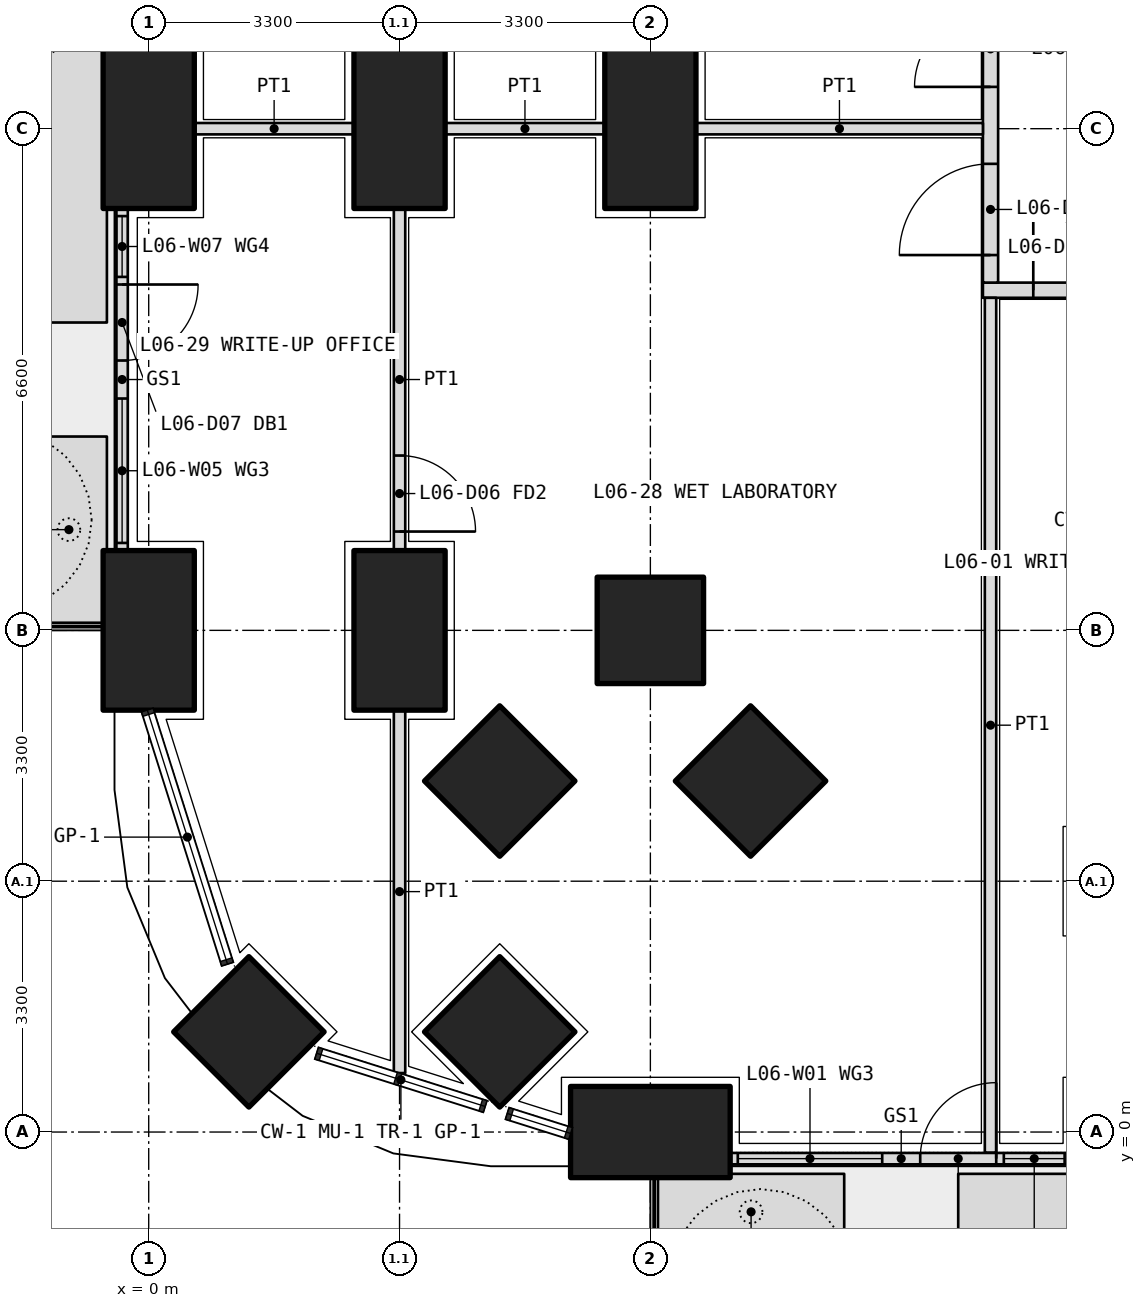
"""IFC4 building model, lengths in metres.
Left out: names, types, materials, properties, quantities, classifications, styles, units other than length and angle.
Written with IfcOpenShell. Run it as: python <this file> out.ifc"""

import sys

from ifc_helpers import new_model, si_unit, direction, frame, frame_2d, origin, origin_2d, place, context, subcontext, project, spatial, polyline, rectangle, outline, extrude, element, fill, save


model = new_model("IFC4")
c1 = context("Model", 3, precision=1e-05, world=origin(), true_north=direction((0.0, 1.0)))
c2 = subcontext(c1, "Body", "Model", "MODEL_VIEW")
j1 = project(units=[si_unit("LENGTHUNIT", "METRE"), si_unit("PLANEANGLEUNIT", "RADIAN")], contexts=[c1])
p1 = place(None, origin())
s1 = spatial("IfcSite", under=j1, at=p1, CompositionType="ELEMENT")
p2 = place(p1, origin())
s2 = spatial("IfcBuilding", under=s1, at=p2, CompositionType="ELEMENT")
p3 = place(p2, frame((0.0, 0.0, 29.7)))
s3 = spatial("IfcBuildingStorey", under=s2, at=p3, CompositionType="ELEMENT", Elevation=29.7)
p4 = place(p3, frame((1.318, 1.318, 0.0), z_axis=(0.0, 0.0, 1.0), x_axis=(0.707106781187, 0.707106781187, 0.0)))
e1 = element("IfcColumn", 1, at=p4, inside=s3, PredefinedType="COLUMN", context=c2, shape_type="SweptSolid", body=[
    extrude(rectangle(XDim=1.4, YDim=1.4, at=origin_2d()), origin(), (0.0, 0.0, 1.0), 4.2),
])
for number, where, z_axis, x_axis in (
    (2, (6.6, 0.0, 0.0), (0.0, 0.0, 1.0), (1.0, 0.0, 0.0)),
    (3, (0.0, 6.6, 0.0), (0.0, 0.0, 1.0), (0.0, 1.0, 0.0)),
    (4, (0.0, 13.2, 0.0), (0.0, 0.0, 1.0), (0.0, 1.0, 0.0)),
):
    element("IfcColumn", number, at=place(p3, frame(where, z_axis=z_axis, x_axis=x_axis)), inside=s3, PredefinedType="COLUMN", context=c2, shape_type="SweptSolid", body=[
        extrude(rectangle(XDim=2.1, YDim=1.2, at=origin_2d()), origin(), (0.0, 0.0, 1.0), 4.2),
    ])
for number, where, z_axis, x_axis in (
    (5, (6.6, 6.6, 0.0), (0.0, 0.0, 1.0), (1.0, 0.0, 0.0)),
    (6, (4.618, 1.318, 0.0), (0.0, 0.0, 1.0), (0.707, 0.707, 0.0)),
):
    element("IfcColumn", number, at=place(p3, frame(where, z_axis=z_axis, x_axis=x_axis)), inside=s3, PredefinedType="COLUMN", context=c2, shape_type="SweptSolid", body=[
        extrude(rectangle(XDim=1.4, YDim=1.4, at=origin_2d()), origin(), (0.0, 0.0, 1.0), 4.2),
    ])
for number, where, z_axis, x_axis in (
    (7, (3.3, 6.6, 0.0), (0.0, 0.0, 1.0), (0.0, 1.0, 0.0)),
    (8, (3.3, 13.2, 0.0), (0.0, 0.0, 1.0), (0.0, 1.0, 0.0)),
):
    element("IfcColumn", number, at=place(p3, frame(where, z_axis=z_axis, x_axis=x_axis)), inside=s3, PredefinedType="COLUMN", context=c2, shape_type="SweptSolid", body=[
        extrude(rectangle(XDim=2.1, YDim=1.2, at=origin_2d()), origin(), (0.0, 0.0, 1.0), 4.2),
    ])
for number, where, z_axis, x_axis in (
    (9, (4.618, 4.618, 0.0), (0.0, 0.0, 1.0), (0.707, 0.707, 0.0)),
    (10, (7.918, 4.618, 0.0), (0.0, 0.0, 1.0), (0.707, 0.707, 0.0)),
):
    element("IfcColumn", number, at=place(p3, frame(where, z_axis=z_axis, x_axis=x_axis)), inside=s3, PredefinedType="COLUMN", context=c2, shape_type="SweptSolid", body=[
        extrude(rectangle(XDim=1.4, YDim=1.4, at=origin_2d()), origin(), (0.0, 0.0, 1.0), 4.2),
    ])
p5 = place(p3, frame((6.6, 13.2, 0.0), z_axis=(0.0, 0.0, 1.0), x_axis=(0.0, 1.0, 0.0)))
e11 = element("IfcColumn", 11, at=p5, inside=s3, PredefinedType="COLUMN", context=c2, shape_type="SweptSolid", body=[
    extrude(rectangle(XDim=2.1, YDim=1.2, at=origin_2d()), origin(), (0.0, 0.0, 1.0), 4.2),
])
p6 = place(p3, origin())
e12 = element("IfcWall", 12, at=p6, inside=s3, PredefinedType="USERDEFINED", context=c2, shape_type="SweptSolid", body=[
    extrude(outline(polyline([(6.7, -1.55), (9.15, -1.55), (9.15, -0.55), (6.7, -0.55), (6.7, -1.55)]), holes=[polyline([(6.85, -1.4), (9.0, -1.4), (9.0, -0.7), (6.85, -0.7), (6.85, -1.4)])]), origin(), (0.0, 0.0, 1.0), 1.05),
])
p7 = place(p3, origin())
e13 = element("IfcWall", 13, at=p7, inside=s3, PredefinedType="USERDEFINED", context=c2, shape_type="SweptSolid", body=[
    extrude(outline(polyline([(10.65, -1.55), (19.7, -1.55), (19.7, -0.55), (10.65, -0.55), (10.65, -1.55)]), holes=[polyline([(10.8, -1.4), (19.55, -1.4), (19.55, -0.7), (10.8, -0.7), (10.8, -1.4)])]), origin(), (0.0, 0.0, 1.0), 1.05),
])
p8 = place(p3, origin())
e14 = element("IfcWall", 14, at=p8, inside=s3, PredefinedType="USERDEFINED", context=c2, shape_type="SweptSolid", body=[
    extrude(outline(polyline([(-1.55, 6.7), (-0.55, 6.7), (-0.55, 9.15), (-1.55, 9.15), (-1.55, 6.7)]), holes=[polyline([(-1.4, 6.85), (-0.7, 6.85), (-0.7, 9.0), (-1.4, 9.0), (-1.4, 6.85)])]), origin(), (0.0, 0.0, 1.0), 1.05),
])
p9 = place(p3, origin())
e15 = element("IfcWall", 15, at=p9, inside=s3, PredefinedType="USERDEFINED", context=c2, shape_type="SweptSolid", body=[
    extrude(outline(polyline([(-1.55, 10.65), (-0.55, 10.65), (-0.55, 19.7), (-1.55, 19.7), (-1.55, 10.65)]), holes=[polyline([(-1.4, 10.8), (-0.7, 10.8), (-0.7, 19.55), (-1.4, 19.55), (-1.4, 10.8)])]), origin(), (0.0, 0.0, 1.0), 1.05),
])
p10 = place(p3, frame((7.65, -0.35, 0.0), z_axis=(0.0, 0.0, 1.0), x_axis=(1.0, 0.0, 0.0)))
e16 = element("IfcWall", 16, at=p10, inside=s3, PredefinedType="SOLIDWALL", context=c2, shape_type="SweptSolid", body=[
    extrude(rectangle(XDim=4.5, YDim=0.15, at=frame_2d((2.25, 0.0))), origin(), (0.0, 0.0, 1.0), 2.7),
])
p11 = place(p10, frame((2.5, 0.0, 0.0)))
e17 = element("IfcOpeningElement", 17, at=p11, cuts=e16, PredefinedType="OPENING", context=c2, shape_type="SweptSolid", body=[
    extrude(rectangle(XDim=1.0, YDim=2.4, at=frame_2d((0.5, 1.2))), frame((0.0, 0.085, 0.0), z_axis=(0.0, -1.0, 0.0), x_axis=(1.0, 0.0, 0.0)), (0.0, 0.0, 1.0), 0.17),
])
p12 = place(p10, frame((0.1, 0.0, 0.1)))
e18 = element("IfcOpeningElement", 18, at=p12, cuts=e16, PredefinedType="OPENING", context=c2, shape_type="SweptSolid", body=[
    extrude(rectangle(XDim=1.9, YDim=2.3, at=frame_2d((0.95, 1.15))), frame((0.0, 0.085, 0.0), z_axis=(0.0, -1.0, 0.0), x_axis=(1.0, 0.0, 0.0)), (0.0, 0.0, 1.0), 0.17),
])
p13 = place(p10, frame((3.6, 0.0, 0.1)))
e19 = element("IfcOpeningElement", 19, at=p13, cuts=e16, PredefinedType="OPENING", context=c2, shape_type="SweptSolid", body=[
    extrude(rectangle(XDim=0.8, YDim=2.3, at=frame_2d((0.4, 1.15))), frame((0.0, 0.085, 0.0), z_axis=(0.0, -1.0, 0.0), x_axis=(1.0, 0.0, 0.0)), (0.0, 0.0, 1.0), 0.17),
])
p14 = place(p3, frame((-0.35, 12.15, 0.0), z_axis=(0.0, 0.0, 1.0), x_axis=(0.0, -1.0, 0.0)))
e20 = element("IfcWall", 20, at=p14, inside=s3, PredefinedType="SOLIDWALL", context=c2, shape_type="SweptSolid", body=[
    extrude(rectangle(XDim=4.5, YDim=0.15, at=frame_2d((2.25, 0.0))), origin(), (0.0, 0.0, 1.0), 2.7),
])
p15 = place(p14, frame((1.0, 0.0, 0.0)))
e21 = element("IfcOpeningElement", 21, at=p15, cuts=e20, PredefinedType="OPENING", context=c2, shape_type="SweptSolid", body=[
    extrude(rectangle(XDim=1.0, YDim=2.4, at=frame_2d((0.5, 1.2))), frame((0.0, 0.085, 0.0), z_axis=(0.0, -1.0, 0.0), x_axis=(1.0, 0.0, 0.0)), (0.0, 0.0, 1.0), 0.17),
])
p16 = place(p14, frame((0.1, 0.0, 0.1)))
e22 = element("IfcOpeningElement", 22, at=p16, cuts=e20, PredefinedType="OPENING", context=c2, shape_type="SweptSolid", body=[
    extrude(rectangle(XDim=0.8, YDim=2.3, at=frame_2d((0.4, 1.15))), frame((0.0, 0.085, 0.0), z_axis=(0.0, -1.0, 0.0), x_axis=(1.0, 0.0, 0.0)), (0.0, 0.0, 1.0), 0.17),
])
p17 = place(p14, frame((2.5, 0.0, 0.1)))
e23 = element("IfcOpeningElement", 23, at=p17, cuts=e20, PredefinedType="OPENING", context=c2, shape_type="SweptSolid", body=[
    extrude(rectangle(XDim=1.9, YDim=2.3, at=frame_2d((0.95, 1.15))), frame((0.0, 0.085, 0.0), z_axis=(0.0, -1.0, 0.0), x_axis=(1.0, 0.0, 0.0)), (0.0, 0.0, 1.0), 0.17),
])
p18 = place(p3, frame((10.975, 11.075, 0.0), z_axis=(0.0, 0.0, 1.0), x_axis=(1.0, 0.0, 0.0)))
e24 = element("IfcWall", 24, at=p18, inside=s3, PredefinedType="PARTITIONING", context=c2, shape_type="SweptSolid", body=[
    extrude(rectangle(XDim=30.85, YDim=0.2, at=frame_2d((15.425, 0.0))), origin(), (0.0, 0.0, 1.0), 2.85),
])
p19 = place(p18, frame((0.663, 0.0, 0.0)))
e25 = element("IfcOpeningElement", 25, at=p19, cuts=e24, PredefinedType="OPENING", context=c2, shape_type="SweptSolid", body=[
    extrude(rectangle(XDim=1.0, YDim=2.1, at=frame_2d((0.5, 1.05))), frame((0.0, 0.11, 0.0), z_axis=(0.0, -1.0, 0.0), x_axis=(1.0, 0.0, 0.0)), (0.0, 0.0, 1.0), 0.22),
])
p20 = place(p18, frame((8.325, 0.0, 0.0)))
e26 = element("IfcOpeningElement", 26, at=p20, cuts=e24, PredefinedType="OPENING", context=c2, shape_type="SweptSolid", body=[
    extrude(rectangle(XDim=1.0, YDim=2.1, at=frame_2d((0.5, 1.05))), frame((0.0, 0.11, 0.0), z_axis=(0.0, -1.0, 0.0), x_axis=(1.0, 0.0, 0.0)), (0.0, 0.0, 1.0), 0.22),
])
p21 = place(p18, frame((19.875, 0.0, 0.0)))
e27 = element("IfcOpeningElement", 27, at=p21, cuts=e24, PredefinedType="OPENING", context=c2, shape_type="SweptSolid", body=[
    extrude(rectangle(XDim=1.0, YDim=2.1, at=frame_2d((0.5, 1.05))), frame((0.0, 0.11, 0.0), z_axis=(0.0, -1.0, 0.0), x_axis=(1.0, 0.0, 0.0)), (0.0, 0.0, 1.0), 0.22),
])
p22 = place(p18, frame((27.538, 0.0, 0.0)))
e28 = element("IfcOpeningElement", 28, at=p22, cuts=e24, PredefinedType="OPENING", context=c2, shape_type="SweptSolid", body=[
    extrude(rectangle(XDim=1.0, YDim=2.1, at=frame_2d((0.5, 1.05))), frame((0.0, 0.11, 0.0), z_axis=(0.0, -1.0, 0.0), x_axis=(1.0, 0.0, 0.0)), (0.0, 0.0, 1.0), 0.22),
])
p23 = place(p3, frame((11.075, 11.175, 0.0), z_axis=(0.0, 0.0, 1.0), x_axis=(0.0, 1.0, 0.0)))
e29 = element("IfcWall", 29, at=p23, inside=s3, PredefinedType="PARTITIONING", context=c2, shape_type="SweptSolid", body=[
    extrude(rectangle(XDim=23.85, YDim=0.2, at=frame_2d((11.925, 0.0))), origin(), (0.0, 0.0, 1.0), 2.85),
])
p24 = place(p23, frame((0.363, 0.0, 0.0)))
e30 = element("IfcOpeningElement", 30, at=p24, cuts=e29, PredefinedType="OPENING", context=c2, shape_type="SweptSolid", body=[
    extrude(rectangle(XDim=1.2, YDim=2.1, at=frame_2d((0.6, 1.05))), frame((0.0, 0.11, 0.0), z_axis=(0.0, -1.0, 0.0), x_axis=(1.0, 0.0, 0.0)), (0.0, 0.0, 1.0), 0.22),
])
p25 = place(p23, frame((2.575, 0.0, 0.0)))
e31 = element("IfcOpeningElement", 31, at=p25, cuts=e29, PredefinedType="OPENING", context=c2, shape_type="SweptSolid", body=[
    extrude(rectangle(XDim=1.0, YDim=2.1, at=frame_2d((0.5, 1.05))), frame((0.0, 0.11, 0.0), z_axis=(0.0, -1.0, 0.0), x_axis=(1.0, 0.0, 0.0)), (0.0, 0.0, 1.0), 0.22),
])
p26 = place(p23, frame((5.625, 0.0, 0.0)))
e32 = element("IfcOpeningElement", 32, at=p26, cuts=e29, PredefinedType="OPENING", context=c2, shape_type="SweptSolid", body=[
    extrude(rectangle(XDim=0.9, YDim=2.1, at=frame_2d((0.45, 1.05))), frame((0.0, 0.11, 0.0), z_axis=(0.0, -1.0, 0.0), x_axis=(1.0, 0.0, 0.0)), (0.0, 0.0, 1.0), 0.22),
])
p27 = place(p23, frame((9.425, 0.0, 0.0)))
e33 = element("IfcOpeningElement", 33, at=p27, cuts=e29, PredefinedType="OPENING", context=c2, shape_type="SweptSolid", body=[
    extrude(rectangle(XDim=0.9, YDim=2.1, at=frame_2d((0.45, 1.05))), frame((0.0, 0.11, 0.0), z_axis=(0.0, -1.0, 0.0), x_axis=(1.0, 0.0, 0.0)), (0.0, 0.0, 1.0), 0.22),
])
p28 = place(p23, frame((12.975, 0.0, 0.0)))
e34 = element("IfcOpeningElement", 34, at=p28, cuts=e29, PredefinedType="OPENING", context=c2, shape_type="SweptSolid", body=[
    extrude(rectangle(XDim=1.0, YDim=2.1, at=frame_2d((0.5, 1.05))), frame((0.0, 0.11, 0.0), z_axis=(0.0, -1.0, 0.0), x_axis=(1.0, 0.0, 0.0)), (0.0, 0.0, 1.0), 0.22),
])
p29 = place(p23, frame((17.925, 0.0, 0.0)))
e35 = element("IfcOpeningElement", 35, at=p29, cuts=e29, PredefinedType="OPENING", context=c2, shape_type="SweptSolid", body=[
    extrude(rectangle(XDim=1.2, YDim=2.1, at=frame_2d((0.6, 1.05))), frame((0.0, 0.11, 0.0), z_axis=(0.0, -1.0, 0.0), x_axis=(1.0, 0.0, 0.0)), (0.0, 0.0, 1.0), 0.22),
])
p30 = place(p23, frame((22.387, 0.0, 0.0)))
e36 = element("IfcOpeningElement", 36, at=p30, cuts=e29, PredefinedType="OPENING", context=c2, shape_type="SweptSolid", body=[
    extrude(rectangle(XDim=1.0, YDim=2.1, at=frame_2d((0.5, 1.05))), frame((0.0, 0.11, 0.0), z_axis=(0.0, -1.0, 0.0), x_axis=(1.0, 0.0, 0.0)), (0.0, 0.0, 1.0), 0.22),
])
p31 = place(p3, frame((11.075, -0.27, 0.0), z_axis=(0.0, 0.0, 1.0), x_axis=(0.0, 1.0, 0.0)))
e37 = element("IfcWall", 37, at=p31, inside=s3, PredefinedType="PARTITIONING", context=c2, shape_type="SweptSolid", body=[
    extrude(rectangle(XDim=11.245, YDim=0.15, at=frame_2d((5.623, 0.0))), origin(), (0.0, 0.0, 1.0), 2.7),
])
p32 = place(p3, frame((3.3, 12.15, 0.0), z_axis=(0.0, 0.0, 1.0), x_axis=(0.0, -1.0, 0.0)))
e38 = element("IfcWall", 38, at=p32, inside=s3, PredefinedType="PARTITIONING", context=c2, shape_type="SweptSolid", body=[
    extrude(rectangle(XDim=4.5, YDim=0.15, at=frame_2d((2.25, 0.0))), origin(), (0.0, 0.0, 1.0), 3.9),
])
p33 = place(p32, frame((3.25, 0.0, 0.0)))
e39 = element("IfcOpeningElement", 39, at=p33, cuts=e38, PredefinedType="OPENING", context=c2, shape_type="SweptSolid", body=[
    extrude(rectangle(XDim=1.0, YDim=2.1, at=frame_2d((0.5, 1.05))), frame((0.0, 0.085, 0.0), z_axis=(0.0, -1.0, 0.0), x_axis=(1.0, 0.0, 0.0)), (0.0, 0.0, 1.0), 0.17),
])
p34 = place(p3, frame((3.3, 5.55, 0.0), z_axis=(0.0, 0.0, 1.0), x_axis=(0.0, -1.0, 0.0)))
e40 = element("IfcWall", 40, at=p34, inside=s3, PredefinedType="PARTITIONING", context=c2, shape_type="SweptSolid", body=[
    extrude(rectangle(XDim=4.774, YDim=0.15, at=frame_2d((2.387, 0.0))), origin(), (0.0, 0.0, 1.0), 2.7),
])
p35 = place(p3, frame((0.6, 13.2, 0.0), z_axis=(0.0, 0.0, 1.0), x_axis=(1.0, 0.0, 0.0)))
e41 = element("IfcWall", 41, at=p35, inside=s3, PredefinedType="PARTITIONING", context=c2, shape_type="SweptSolid", body=[
    extrude(rectangle(XDim=2.1, YDim=0.15, at=frame_2d((1.05, 0.0))), origin(), (0.0, 0.0, 1.0), 2.85),
])
p36 = place(p3, frame((3.9, 13.2, 0.0), z_axis=(0.0, 0.0, 1.0), x_axis=(1.0, 0.0, 0.0)))
e42 = element("IfcWall", 42, at=p36, inside=s3, PredefinedType="PARTITIONING", context=c2, shape_type="SweptSolid", body=[
    extrude(rectangle(XDim=2.1, YDim=0.15, at=frame_2d((1.05, 0.0))), origin(), (0.0, 0.0, 1.0), 2.85),
])
p37 = place(p3, frame((7.2, 13.2, 0.0), z_axis=(0.0, 0.0, 1.0), x_axis=(1.0, 0.0, 0.0)))
e43 = element("IfcWall", 43, at=p37, inside=s3, PredefinedType="PARTITIONING", context=c2, shape_type="SweptSolid", body=[
    extrude(rectangle(XDim=3.775, YDim=0.15, at=frame_2d((1.888, 0.0))), origin(), (0.0, 0.0, 1.0), 2.85),
])
p38 = place(p11, origin())
e44 = element("IfcDoor", 44, at=p38, inside=s3, OperationType="SINGLE_SWING_RIGHT", PredefinedType="DOOR", context=c2, shape_type="SweptSolid", body=[
    extrude(rectangle(XDim=1.0, YDim=2.4, at=frame_2d((0.5, 1.2))), frame((0.0, 0.025, 0.0), z_axis=(0.0, -1.0, 0.0), x_axis=(1.0, 0.0, 0.0)), (0.0, 0.0, 1.0), 0.05),
])
fill(e17, e44)
p39 = place(p12, origin())
e45 = element("IfcWindow", 45, at=p39, inside=s3, PartitioningType="SINGLE_PANEL", PredefinedType="WINDOW", context=c2, shape_type="SweptSolid", body=[
    extrude(rectangle(XDim=1.9, YDim=2.3, at=frame_2d((0.95, 1.15))), frame((0.0, 0.03, 0.0), z_axis=(0.0, -1.0, 0.0), x_axis=(1.0, 0.0, 0.0)), (0.0, 0.0, 1.0), 0.06),
])
fill(e18, e45)
p40 = place(p13, origin())
e46 = element("IfcWindow", 46, at=p40, inside=s3, PartitioningType="SINGLE_PANEL", PredefinedType="WINDOW", context=c2, shape_type="SweptSolid", body=[
    extrude(rectangle(XDim=0.8, YDim=2.3, at=frame_2d((0.4, 1.15))), frame((0.0, 0.03, 0.0), z_axis=(0.0, -1.0, 0.0), x_axis=(1.0, 0.0, 0.0)), (0.0, 0.0, 1.0), 0.06),
])
fill(e19, e46)
p41 = place(p15, origin())
e47 = element("IfcDoor", 47, at=p41, inside=s3, OperationType="SINGLE_SWING_LEFT", PredefinedType="DOOR", context=c2, shape_type="SweptSolid", body=[
    extrude(rectangle(XDim=1.0, YDim=2.4, at=frame_2d((0.5, 1.2))), frame((0.0, 0.025, 0.0), z_axis=(0.0, -1.0, 0.0), x_axis=(1.0, 0.0, 0.0)), (0.0, 0.0, 1.0), 0.05),
])
fill(e21, e47)
p42 = place(p16, origin())
e48 = element("IfcWindow", 48, at=p42, inside=s3, PartitioningType="SINGLE_PANEL", PredefinedType="WINDOW", context=c2, shape_type="SweptSolid", body=[
    extrude(rectangle(XDim=0.8, YDim=2.3, at=frame_2d((0.4, 1.15))), frame((0.0, 0.03, 0.0), z_axis=(0.0, -1.0, 0.0), x_axis=(1.0, 0.0, 0.0)), (0.0, 0.0, 1.0), 0.06),
])
fill(e22, e48)
p43 = place(p17, origin())
e49 = element("IfcWindow", 49, at=p43, inside=s3, PartitioningType="SINGLE_PANEL", PredefinedType="WINDOW", context=c2, shape_type="SweptSolid", body=[
    extrude(rectangle(XDim=1.9, YDim=2.3, at=frame_2d((0.95, 1.15))), frame((0.0, 0.03, 0.0), z_axis=(0.0, -1.0, 0.0), x_axis=(1.0, 0.0, 0.0)), (0.0, 0.0, 1.0), 0.06),
])
fill(e23, e49)
p44 = place(p19, origin())
e50 = element("IfcDoor", 50, at=p44, inside=s3, OperationType="SINGLE_SWING_LEFT", PredefinedType="DOOR", context=c2, shape_type="SweptSolid", body=[
    extrude(rectangle(XDim=1.0, YDim=2.1, at=frame_2d((0.5, 1.05))), frame((0.0, 0.025, 0.0), z_axis=(0.0, -1.0, 0.0), x_axis=(1.0, 0.0, 0.0)), (0.0, 0.0, 1.0), 0.05),
])
fill(e25, e50)
p45 = place(p24, origin())
e51 = element("IfcDoor", 51, at=p45, inside=s3, OperationType="DOUBLE_DOOR_SINGLE_SWING", PredefinedType="DOOR", context=c2, shape_type="SweptSolid", body=[
    extrude(rectangle(XDim=1.2, YDim=2.1, at=frame_2d((0.6, 1.05))), frame((0.0, 0.025, 0.0), z_axis=(0.0, -1.0, 0.0), x_axis=(1.0, 0.0, 0.0)), (0.0, 0.0, 1.0), 0.05),
])
fill(e30, e51)
p46 = place(p33, origin())
e52 = element("IfcDoor", 52, at=p46, inside=s3, OperationType="SINGLE_SWING_RIGHT", PredefinedType="DOOR", context=c2, shape_type="SweptSolid", body=[
    extrude(rectangle(XDim=1.0, YDim=2.1, at=frame_2d((0.5, 1.05))), frame((0.0, 0.025, 0.0), z_axis=(0.0, -1.0, 0.0), x_axis=(1.0, 0.0, 0.0)), (0.0, 0.0, 1.0), 0.05),
])
fill(e39, e52)
p47 = place(p25, origin())
e53 = element("IfcDoor", 53, at=p47, inside=s3, OperationType="SINGLE_SWING_LEFT", PredefinedType="DOOR", context=c2, shape_type="SweptSolid", body=[
    extrude(rectangle(XDim=1.0, YDim=2.1, at=frame_2d((0.5, 1.05))), frame((0.0, 0.025, 0.0), z_axis=(0.0, -1.0, 0.0), x_axis=(1.0, 0.0, 0.0)), (0.0, 0.0, 1.0), 0.05),
])
fill(e31, e53)
save(model, sys.argv[1])
